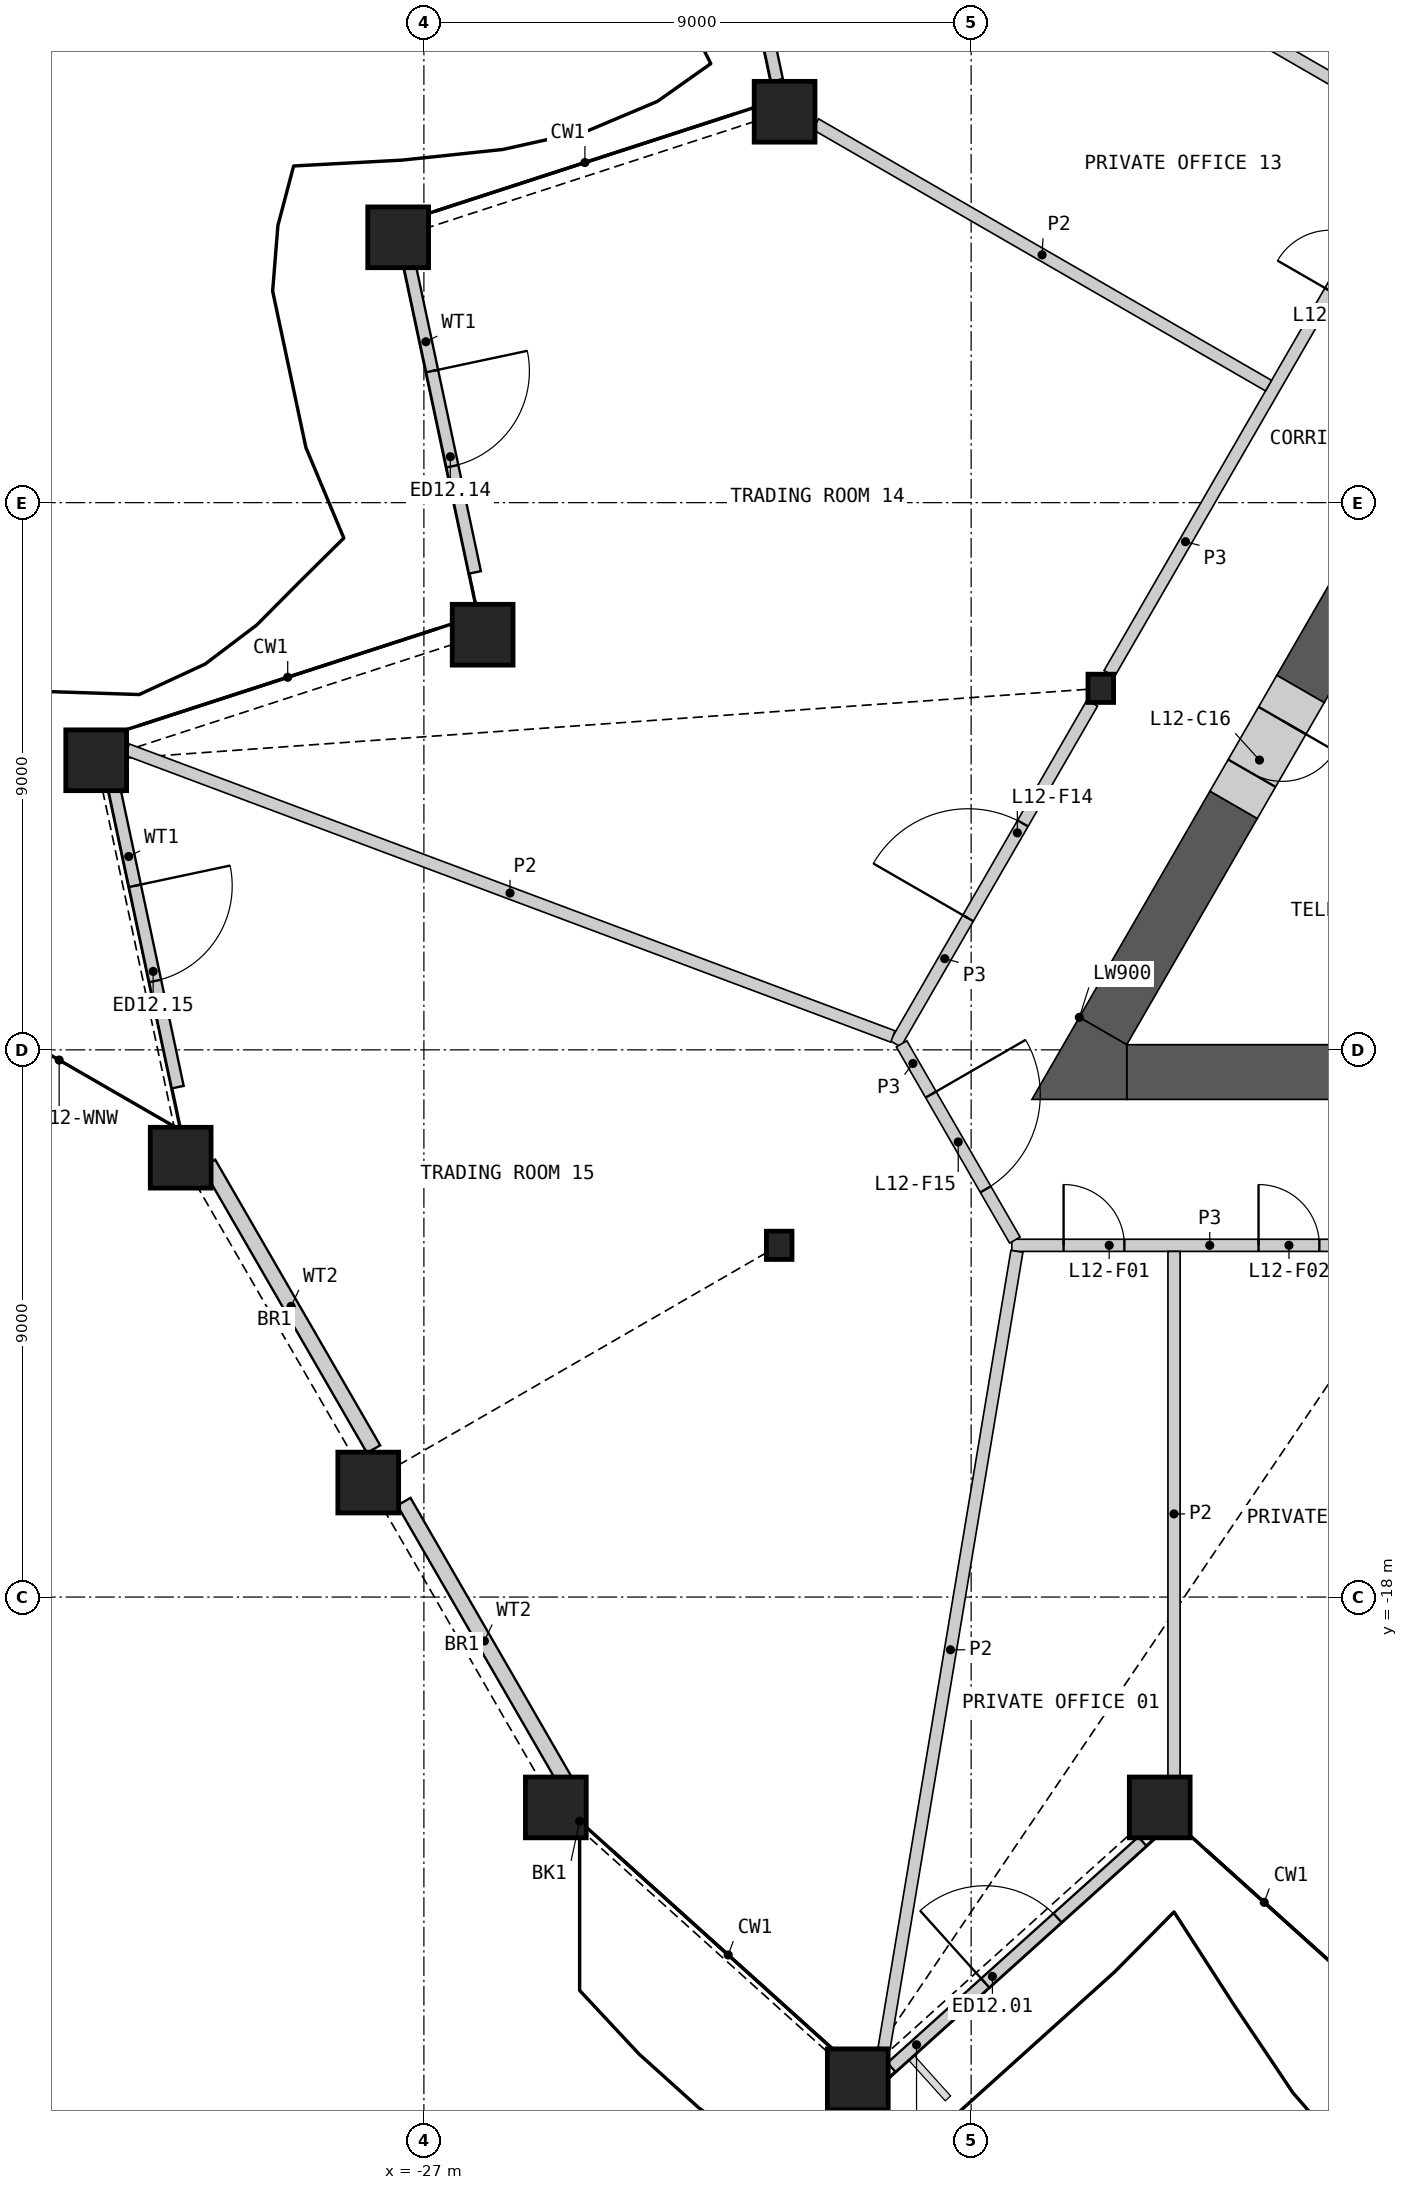
"""IFC4 building model, lengths in metres.
Left out: names, types, materials, properties, quantities, classifications, styles, units other than length and angle.
Written with IfcOpenShell. Run it as: python <this file> out.ifc"""

import sys

from ifc_helpers import new_model, si_unit, direction, frame, frame_2d, origin, origin_2d, place, context, subcontext, project, spatial, polyline, rectangle, hollow_rectangle, i_section, outline, extrude, element, fill, save


model = new_model("IFC4")
c1 = context("Model", 3, precision=1e-05, world=origin(), true_north=direction((0.0, 1.0)))
c2 = subcontext(c1, "Body", "Model", "MODEL_VIEW")
j1 = project(units=[si_unit("LENGTHUNIT", "METRE"), si_unit("PLANEANGLEUNIT", "RADIAN")], contexts=[c1])
p1 = place(None, origin())
s1 = spatial("IfcSite", under=j1, at=p1, CompositionType="ELEMENT")
p2 = place(p1, origin())
s2 = spatial("IfcBuilding", under=s1, at=p2, CompositionType="ELEMENT")
p3 = place(p2, frame((0.0, 0.0, 59.4)))
s3 = spatial("IfcBuildingStorey", under=s2, at=p3, CompositionType="ELEMENT", Elevation=59.4)
for number, where, z_axis, x_axis in (
    (1, (-24.83, -21.46, 0.0), (0.0, 0.0, 1.0), (1.0, 0.0, 0.0)),
    (2, (-19.864, -25.931, 0.0), (0.0, 0.0, 1.0), (1.0, 0.0, 0.0)),
    (3, (-14.898, -21.46, 0.0), (0.0, 0.0, 1.0), (1.0, 0.0, 0.0)),
    (4, (-21.068, 6.429, 0.0), (0.0, 0.0, 1.0), (1.0, 0.0, 0.0)),
    (5, (-27.423, 4.364, 0.0), (0.0, 0.0, 1.0), (1.0, 0.0, 0.0)),
    (6, (-26.034, -2.172, 0.0), (0.0, 0.0, 1.0), (1.0, 0.0, 0.0)),
    (7, (-32.389, -4.237, 0.0), (0.0, 0.0, 1.0), (1.0, 0.0, 0.0)),
    (8, (-31.0, -10.774, 0.0), (0.0, 0.0, 1.0), (1.0, 0.0, 0.0)),
    (9, (-27.915, -16.117, 0.0), (0.0, 0.0, 1.0), (1.0, 0.0, 0.0)),
):
    element("IfcColumn", number, at=place(p3, frame(where, z_axis=z_axis, x_axis=x_axis)), inside=s3, PredefinedType="COLUMN", context=c2, shape_type="SweptSolid", body=[
        extrude(hollow_rectangle(XDim=1.0, YDim=1.0, WallThickness=0.07, at=origin_2d()), origin(), (0.0, 0.0, 1.0), 4.2),
    ])
for number, where, z_axis, x_axis in (
    (10, (-15.868, -3.054, 0.0), (0.0, 0.0, 1.0), (1.0, 0.0, 0.0)),
    (11, (-21.157, -12.215, 0.0), (0.0, 0.0, 1.0), (1.0, 0.0, 0.0)),
):
    element("IfcColumn", number, at=place(p3, frame(where, z_axis=z_axis, x_axis=x_axis)), inside=s3, PredefinedType="COLUMN", context=c2, shape_type="SweptSolid", body=[
        extrude(i_section(OverallWidth=0.421, OverallDepth=0.465, WebThickness=0.045, FlangeThickness=0.072, at=origin_2d()), origin(), (0.0, 0.0, 1.0), 4.2),
    ])
p4 = place(p3, frame((-19.311, -25.736, 0.0), z_axis=(0.0, 0.0, 1.0), x_axis=(0.743147692621, 0.66912742206, 0.0)))
e12 = element("IfcWall", 12, at=p4, inside=s3, PredefinedType="SOLIDWALL", context=c2, shape_type="SweptSolid", body=[
    extrude(rectangle(XDim=5.554, YDim=0.2, at=frame_2d((2.777, 0.0))), origin(), (0.0, 0.0, 1.0), 3.189),
])
p5 = place(p4, frame((2.075, 0.0, 0.0)))
e13 = element("IfcOpeningElement", 13, at=p5, cuts=e12, PredefinedType="OPENING", context=c2, shape_type="SweptSolid", body=[
    extrude(rectangle(XDim=1.6, YDim=2.4, at=frame_2d((0.8, 1.2))), frame((0.0, 0.11, 0.0), z_axis=(0.0, -1.0, 0.0), x_axis=(1.0, 0.0, 0.0)), (0.0, 0.0, 1.0), 0.22),
])
p6 = place(p3, frame((-22.363, 12.449, 0.0), z_axis=(0.0, 0.0, 1.0), x_axis=(0.207901831982, -0.978149696242, 0.0)))
e14 = element("IfcWall", 14, at=p6, inside=s3, PredefinedType="SOLIDWALL", context=c2, shape_type="SweptSolid", body=[
    extrude(rectangle(XDim=5.626, YDim=0.2, at=frame_2d((2.813, 0.0))), origin(), (0.0, 0.0, 1.0), 3.189),
])
p7 = place(p6, frame((1.86, 0.0, 0.0)))
e15 = element("IfcOpeningElement", 15, at=p7, cuts=e14, PredefinedType="OPENING", context=c2, shape_type="SweptSolid", body=[
    extrude(rectangle(XDim=1.6, YDim=2.4, at=frame_2d((0.8, 1.2))), frame((0.0, 0.11, 0.0), z_axis=(0.0, -1.0, 0.0), x_axis=(1.0, 0.0, 0.0)), (0.0, 0.0, 1.0), 0.22),
])
p8 = place(p3, frame((-27.236, 3.911, 0.0), z_axis=(0.0, 0.0, 1.0), x_axis=(0.207877954287, -0.978154771047, 0.0)))
e16 = element("IfcWall", 16, at=p8, inside=s3, PredefinedType="SOLIDWALL", context=c2, shape_type="SweptSolid", body=[
    extrude(rectangle(XDim=5.171, YDim=0.2, at=frame_2d((2.585, 0.0))), origin(), (0.0, 0.0, 1.0), 3.189),
])
p9 = place(p8, frame((1.786, 0.0, 0.0)))
e17 = element("IfcOpeningElement", 17, at=p9, cuts=e16, PredefinedType="OPENING", context=c2, shape_type="SweptSolid", body=[
    extrude(rectangle(XDim=1.6, YDim=2.4, at=frame_2d((0.8, 1.2))), frame((0.0, 0.11, 0.0), z_axis=(0.0, -1.0, 0.0), x_axis=(1.0, 0.0, 0.0)), (0.0, 0.0, 1.0), 0.22),
])
p10 = place(p3, frame((-32.124, -4.555, 0.0), z_axis=(0.0, 0.0, 1.0), x_axis=(0.207923126203, -0.978145169998, 0.0)))
e18 = element("IfcWall", 18, at=p10, inside=s3, PredefinedType="SOLIDWALL", context=c2, shape_type="SweptSolid", body=[
    extrude(rectangle(XDim=5.171, YDim=0.2, at=frame_2d((2.585, 0.0))), origin(), (0.0, 0.0, 1.0), 3.189),
])
p11 = place(p10, frame((1.786, 0.0, 0.0)))
e19 = element("IfcOpeningElement", 19, at=p11, cuts=e18, PredefinedType="OPENING", context=c2, shape_type="SweptSolid", body=[
    extrude(rectangle(XDim=1.6, YDim=2.4, at=frame_2d((0.8, 1.2))), frame((0.0, 0.11, 0.0), z_axis=(0.0, -1.0, 0.0), x_axis=(1.0, 0.0, 0.0)), (0.0, 0.0, 1.0), 0.22),
])
p12 = place(p3, frame((-30.54, -10.868, 0.0), z_axis=(0.0, 0.0, 1.0), x_axis=(0.499991204533, -0.86603048179, 0.0)))
e20 = element("IfcWall", 20, at=p12, inside=s3, PredefinedType="SOLIDWALL", context=c2, shape_type="SweptSolid", body=[
    extrude(rectangle(XDim=5.426, YDim=0.25, at=frame_2d((2.713, 0.0))), origin(), (0.0, 0.0, 1.0), 3.189),
])
p13 = place(p3, frame((-27.329, -16.431, 0.0), z_axis=(0.0, 0.0, 1.0), x_axis=(0.500008603535, -0.866020436474, 0.0)))
e21 = element("IfcWall", 21, at=p13, inside=s3, PredefinedType="SOLIDWALL", context=c2, shape_type="SweptSolid", body=[
    extrude(rectangle(XDim=5.293, YDim=0.25, at=frame_2d((2.646, 0.0))), origin(), (0.0, 0.0, 1.0), 3.189),
])
p14 = place(p3, frame((-15.441, -9.365, 0.0), z_axis=(0.0, 0.0, 1.0), x_axis=(1.0, 0.0, 0.0)))
e22 = element("IfcWall", 22, at=p14, inside=s3, PredefinedType="SHEAR", context=c2, shape_type="SweptSolid", body=[
    extrude(rectangle(XDim=14.341, YDim=0.9, at=frame_2d((7.17, 0.0))), origin(), (0.0, 0.0, 1.0), 3.8),
])
p15 = place(p3, frame((-10.31, 0.872, 0.0), z_axis=(0.0, 0.0, 1.0), x_axis=(-0.499968858743, -0.866043382451, 0.0)))
e23 = element("IfcWall", 23, at=p15, inside=s3, PredefinedType="SHEAR", context=c2, shape_type="SweptSolid", body=[
    extrude(rectangle(XDim=4.546, YDim=0.9, at=frame_2d((2.273, 0.0))), origin(), (0.0, 0.0, 1.0), 3.8),
])
p16 = place(p3, frame((-13.683, -4.97, 0.0), z_axis=(0.0, 0.0, 1.0), x_axis=(-0.499996331799, -0.866027521611, 0.0)))
e24 = element("IfcWall", 24, at=p16, inside=s3, PredefinedType="SHEAR", context=c2, shape_type="SweptSolid", body=[
    extrude(rectangle(XDim=4.295, YDim=0.9, at=frame_2d((2.148, 0.0))), origin(), (0.0, 0.0, 1.0), 3.8),
])
p17 = place(p3, origin())
e25 = element("IfcWall", 25, at=p17, inside=s3, PredefinedType="SHEAR", context=c2, shape_type="SweptSolid", body=[
    extrude(outline(polyline([(-16.221, -8.465), (-15.441, -8.915), (-15.441, -9.815), (-17.0, -9.815), (-16.221, -8.465)])), origin(), (0.0, 0.0, 1.0), 3.8),
])
p18 = place(p3, frame((-12.583, -3.065, 0.0), z_axis=(0.0, 0.0, 1.0), x_axis=(-0.50002983664, -0.866008176907, 0.0)))
e26 = element("IfcWall", 26, at=p18, inside=s3, PredefinedType="SHEAR", context=c2, shape_type="SweptSolid", body=[
    extrude(rectangle(XDim=2.2, YDim=0.9, at=frame_2d((1.1, 0.0))), origin(), (0.0, 0.0, 1.0), 3.8),
])
p19 = place(p18, frame((0.6, 0.0, 0.0)))
e27 = element("IfcOpeningElement", 27, at=p19, cuts=e26, PredefinedType="OPENING", context=c2, shape_type="SweptSolid", body=[
    extrude(rectangle(XDim=1.0, YDim=2.1, at=frame_2d((0.5, 1.05))), frame((0.0, 0.46, 0.0), z_axis=(0.0, -1.0, 0.0), x_axis=(1.0, 0.0, 0.0)), (0.0, 0.0, 1.0), 0.92),
])
p20 = place(p3, frame((-15.728, -2.811, 0.0), z_axis=(0.0, 0.0, 1.0), x_axis=(0.49999175339, 0.866030164915, 0.0)))
e28 = element("IfcWall", 28, at=p20, inside=s3, PredefinedType="PARTITIONING", context=c2, shape_type="SweptSolid", body=[
    extrude(rectangle(XDim=10.019, YDim=0.2, at=frame_2d((5.009, 0.0))), origin(), (0.0, 0.0, 1.0), 3.8),
])
p21 = place(p20, frame((7.266, 0.0, 0.0)))
e29 = element("IfcOpeningElement", 29, at=p21, cuts=e28, PredefinedType="OPENING", context=c2, shape_type="SweptSolid", body=[
    extrude(rectangle(XDim=1.0, YDim=2.1, at=frame_2d((0.5, 1.05))), frame((0.0, 0.11, 0.0), z_axis=(0.0, -1.0, 0.0), x_axis=(1.0, 0.0, 0.0)), (0.0, 0.0, 1.0), 0.22),
])
p22 = place(p3, frame((-17.331, -12.215, 0.0), z_axis=(0.0, 0.0, 1.0), x_axis=(1.0, 0.0, 0.0)))
e30 = element("IfcWall", 30, at=p22, inside=s3, PredefinedType="PARTITIONING", context=c2, shape_type="SweptSolid", body=[
    extrude(rectangle(XDim=6.51, YDim=0.2, at=frame_2d((3.255, 0.0))), origin(), (0.0, 0.0, 1.0), 3.8),
])
p23 = place(p22, frame((0.851, 0.0, 0.0)))
e31 = element("IfcOpeningElement", 31, at=p23, cuts=e30, PredefinedType="OPENING", context=c2, shape_type="SweptSolid", body=[
    extrude(rectangle(XDim=1.0, YDim=2.1, at=frame_2d((0.5, 1.05))), frame((0.0, 0.11, 0.0), z_axis=(0.0, -1.0, 0.0), x_axis=(1.0, 0.0, 0.0)), (0.0, 0.0, 1.0), 0.22),
])
p24 = place(p22, frame((4.058, 0.0, 0.0)))
e32 = element("IfcOpeningElement", 32, at=p24, cuts=e30, PredefinedType="OPENING", context=c2, shape_type="SweptSolid", body=[
    extrude(rectangle(XDim=1.0, YDim=2.1, at=frame_2d((0.5, 1.05))), frame((0.0, 0.11, 0.0), z_axis=(0.0, -1.0, 0.0), x_axis=(1.0, 0.0, 0.0)), (0.0, 0.0, 1.0), 0.22),
])
p25 = place(p3, frame((-19.244, -8.902, 0.0), z_axis=(0.0, 0.0, 1.0), x_axis=(0.499984737558, 0.86603421538, 0.0)))
e33 = element("IfcWall", 33, at=p25, inside=s3, PredefinedType="PARTITIONING", context=c2, shape_type="SweptSolid", body=[
    extrude(rectangle(XDim=6.473, YDim=0.2, at=frame_2d((3.236, 0.0))), origin(), (0.0, 0.0, 1.0), 3.8),
])
p26 = place(p25, frame((2.387, 0.0, 0.0)))
e34 = element("IfcOpeningElement", 34, at=p26, cuts=e33, PredefinedType="OPENING", context=c2, shape_type="SweptSolid", body=[
    extrude(rectangle(XDim=1.8, YDim=2.1, at=frame_2d((0.9, 1.05))), frame((0.0, 0.11, 0.0), z_axis=(0.0, -1.0, 0.0), x_axis=(1.0, 0.0, 0.0)), (0.0, 0.0, 1.0), 0.22),
])
p27 = place(p3, frame((-19.144, -8.902, 0.0), z_axis=(0.0, 0.0, 1.0), x_axis=(0.499958791762, -0.866049194065, 0.0)))
e35 = element("IfcWall", 35, at=p27, inside=s3, PredefinedType="PARTITIONING", context=c2, shape_type="SweptSolid", body=[
    extrude(rectangle(XDim=3.726, YDim=0.2, at=frame_2d((1.863, 0.0))), origin(), (0.0, 0.0, 1.0), 3.8),
])
p28 = place(p27, frame((0.963, 0.0, 0.0)))
e36 = element("IfcOpeningElement", 36, at=p28, cuts=e35, PredefinedType="OPENING", context=c2, shape_type="SweptSolid", body=[
    extrude(rectangle(XDim=1.8, YDim=2.1, at=frame_2d((0.9, 1.05))), frame((0.0, 0.11, 0.0), z_axis=(0.0, -1.0, 0.0), x_axis=(1.0, 0.0, 0.0)), (0.0, 0.0, 1.0), 0.22),
])
p29 = place(p3, frame((-31.879, -4.062, 0.0), z_axis=(0.0, 0.0, 1.0), x_axis=(0.93644254502, -0.350820979814, 0.0)))
e37 = element("IfcWall", 37, at=p29, inside=s3, PredefinedType="PARTITIONING", context=c2, shape_type="SweptSolid", body=[
    extrude(rectangle(XDim=13.447, YDim=0.2, at=frame_2d((6.723, 0.0))), origin(), (0.0, 0.0, 1.0), 2.885),
])
p30 = place(p3, frame((-19.432, -25.421, 0.0), z_axis=(0.0, 0.0, 1.0), x_axis=(0.164396008001, 0.986394420378, 0.0)))
e38 = element("IfcWall", 38, at=p30, inside=s3, PredefinedType="PARTITIONING", context=c2, shape_type="SweptSolid", body=[
    extrude(rectangle(XDim=13.289, YDim=0.2, at=frame_2d((6.644, 0.0))), origin(), (0.0, 0.0, 1.0), 2.885),
])
p31 = place(p3, frame((-21.947, 12.671, 0.0), z_axis=(0.0, 0.0, 1.0), x_axis=(0.866026729935, -0.499997703033, 0.0)))
e39 = element("IfcWall", 39, at=p31, inside=s3, PredefinedType="PARTITIONING", context=c2, shape_type="SweptSolid", body=[
    extrude(rectangle(XDim=12.848, YDim=0.2, at=frame_2d((6.424, 0.0))), origin(), (0.0, 0.0, 1.0), 2.885),
])
p32 = place(p3, frame((-14.663, -20.95, 0.0), z_axis=(0.0, 0.0, 1.0), x_axis=(0.0, 1.0, 0.0)))
e40 = element("IfcWall", 40, at=p32, inside=s3, PredefinedType="PARTITIONING", context=c2, shape_type="SweptSolid", body=[
    extrude(rectangle(XDim=8.635, YDim=0.2, at=frame_2d((4.317, 0.0))), origin(), (0.0, 0.0, 1.0), 2.885),
])
p33 = place(p3, frame((-20.558, 6.225, 0.0), z_axis=(0.0, 0.0, 1.0), x_axis=(0.866031967744, -0.499988630717, 0.0)))
e41 = element("IfcWall", 41, at=p33, inside=s3, PredefinedType="PARTITIONING", context=c2, shape_type="SweptSolid", body=[
    extrude(rectangle(XDim=8.601, YDim=0.2, at=frame_2d((4.301, 0.0))), origin(), (0.0, 0.0, 1.0), 2.885),
])
p34 = place(p5, origin())
e42 = element("IfcDoor", 42, at=p34, inside=s3, OperationType="DOUBLE_DOOR_SINGLE_SWING", PredefinedType="DOOR", context=c2, shape_type="SweptSolid", body=[
    extrude(rectangle(XDim=1.6, YDim=2.4, at=frame_2d((0.8, 1.2))), frame((0.0, 0.025, 0.0), z_axis=(0.0, -1.0, 0.0), x_axis=(1.0, 0.0, 0.0)), (0.0, 0.0, 1.0), 0.05),
])
fill(e13, e42)
p35 = place(p9, origin())
e43 = element("IfcDoor", 43, at=p35, inside=s3, OperationType="DOUBLE_DOOR_SINGLE_SWING", PredefinedType="DOOR", context=c2, shape_type="SweptSolid", body=[
    extrude(rectangle(XDim=1.6, YDim=2.4, at=frame_2d((0.8, 1.2))), frame((0.0, 0.025, 0.0), z_axis=(0.0, -1.0, 0.0), x_axis=(1.0, 0.0, 0.0)), (0.0, 0.0, 1.0), 0.05),
])
fill(e17, e43)
p36 = place(p11, origin())
e44 = element("IfcDoor", 44, at=p36, inside=s3, OperationType="DOUBLE_DOOR_SINGLE_SWING", PredefinedType="DOOR", context=c2, shape_type="SweptSolid", body=[
    extrude(rectangle(XDim=1.6, YDim=2.4, at=frame_2d((0.8, 1.2))), frame((0.0, 0.025, 0.0), z_axis=(0.0, -1.0, 0.0), x_axis=(1.0, 0.0, 0.0)), (0.0, 0.0, 1.0), 0.05),
])
fill(e19, e44)
p37 = place(p19, origin())
e45 = element("IfcDoor", 45, at=p37, inside=s3, OperationType="SINGLE_SWING_LEFT", PredefinedType="DOOR", context=c2, shape_type="SweptSolid", body=[
    extrude(rectangle(XDim=1.0, YDim=2.1, at=frame_2d((0.5, 1.05))), frame((0.0, 0.205, 0.0), z_axis=(0.0, -1.0, 0.0), x_axis=(1.0, 0.0, 0.0)), (0.0, 0.0, 1.0), 0.05),
])
fill(e27, e45)
p38 = place(p23, origin())
e46 = element("IfcDoor", 46, at=p38, inside=s3, OperationType="SINGLE_SWING_LEFT", PredefinedType="DOOR", context=c2, shape_type="SweptSolid", body=[
    extrude(rectangle(XDim=1.0, YDim=2.1, at=frame_2d((0.5, 1.05))), frame((0.0, 0.025, 0.0), z_axis=(0.0, -1.0, 0.0), x_axis=(1.0, 0.0, 0.0)), (0.0, 0.0, 1.0), 0.05),
])
fill(e31, e46)
p39 = place(p24, origin())
e47 = element("IfcDoor", 47, at=p39, inside=s3, OperationType="SINGLE_SWING_LEFT", PredefinedType="DOOR", context=c2, shape_type="SweptSolid", body=[
    extrude(rectangle(XDim=1.0, YDim=2.1, at=frame_2d((0.5, 1.05))), frame((0.0, 0.025, 0.0), z_axis=(0.0, -1.0, 0.0), x_axis=(1.0, 0.0, 0.0)), (0.0, 0.0, 1.0), 0.05),
])
fill(e32, e47)
p40 = place(p26, origin())
e48 = element("IfcDoor", 48, at=p40, inside=s3, OperationType="DOUBLE_DOOR_SINGLE_SWING", PredefinedType="DOOR", context=c2, shape_type="SweptSolid", body=[
    extrude(rectangle(XDim=1.8, YDim=2.1, at=frame_2d((0.9, 1.05))), frame((0.0, 0.025, 0.0), z_axis=(0.0, -1.0, 0.0), x_axis=(1.0, 0.0, 0.0)), (0.0, 0.0, 1.0), 0.05),
])
fill(e34, e48)
p41 = place(p28, origin())
e49 = element("IfcDoor", 49, at=p41, inside=s3, OperationType="DOUBLE_DOOR_SINGLE_SWING", PredefinedType="DOOR", context=c2, shape_type="SweptSolid", body=[
    extrude(rectangle(XDim=1.8, YDim=2.1, at=frame_2d((0.9, 1.05))), frame((0.0, 0.025, 0.0), z_axis=(0.0, -1.0, 0.0), x_axis=(1.0, 0.0, 0.0)), (0.0, 0.0, 1.0), 0.05),
])
fill(e36, e49)
save(model, sys.argv[1])
